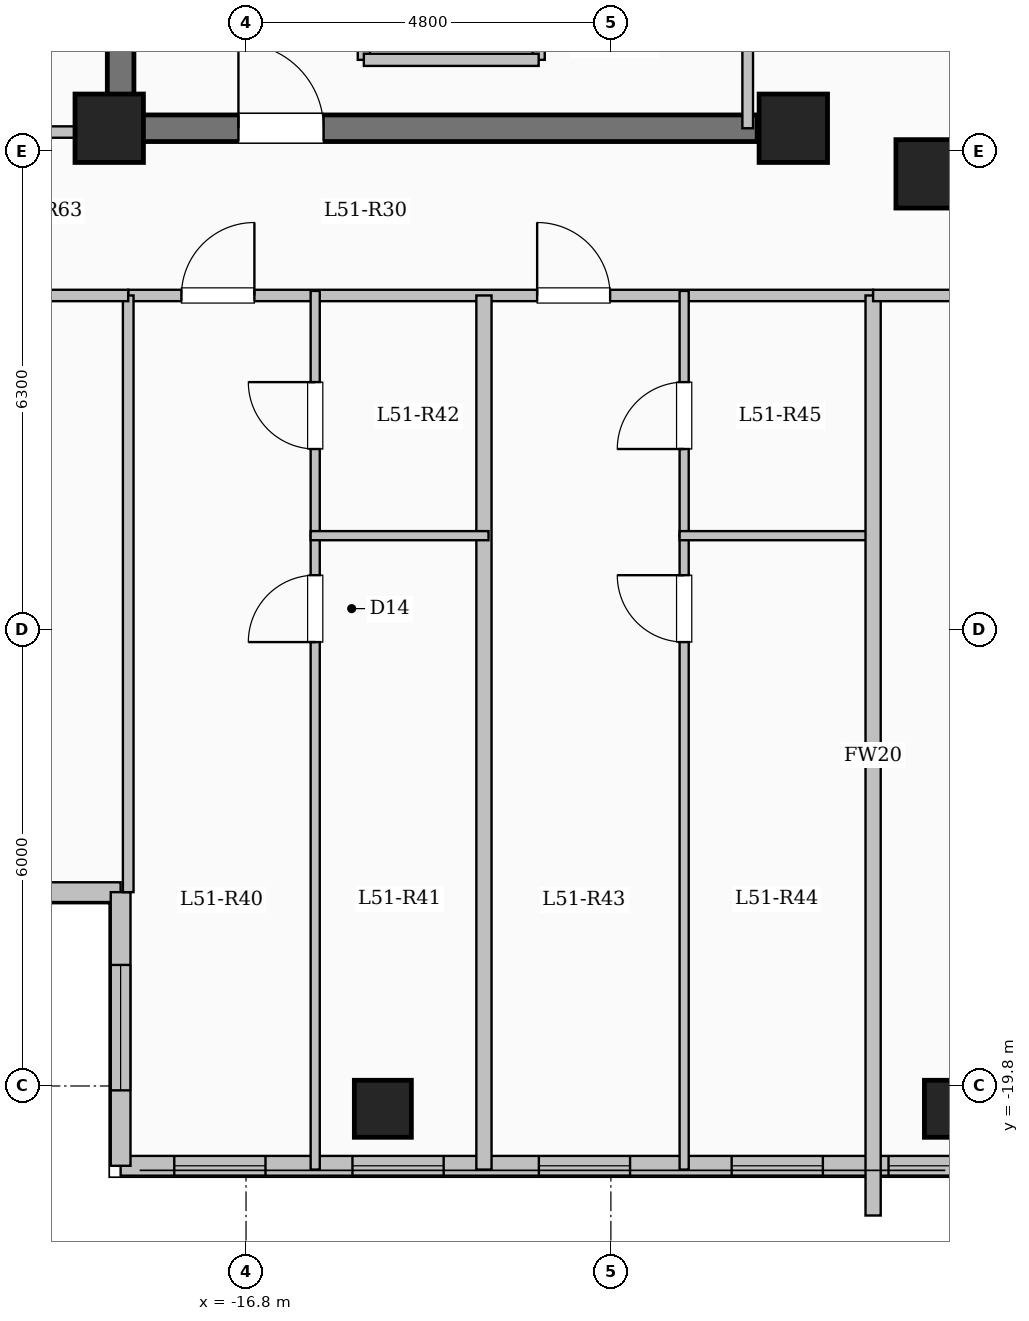
"""IFC4 building model, lengths in metres.
Left out: names, types, materials, properties, quantities, classifications, styles, units other than length and angle.
Written with IfcOpenShell. Run it as: python <this file> out.ifc"""

import sys

from ifc_helpers import new_model, si_unit, direction, frame, frame_2d, origin, origin_2d, place, context, subcontext, project, spatial, rectangle, extrude, element, fill, save


model = new_model("IFC4")
c1 = context("Model", 3, precision=1e-05, world=origin(), true_north=direction((0.0, 1.0)))
c2 = subcontext(c1, "Body", "Model", "MODEL_VIEW")
j1 = project(units=[si_unit("LENGTHUNIT", "METRE"), si_unit("PLANEANGLEUNIT", "RADIAN")], contexts=[c1])
p1 = place(None, origin())
s1 = spatial("IfcSite", under=j1, at=p1, CompositionType="ELEMENT")
p2 = place(p1, origin())
s2 = spatial("IfcBuilding", under=s1, at=p2, CompositionType="ELEMENT")
p3 = place(p2, frame((0.0, 0.0, 190.25)))
s3 = spatial("IfcBuildingStorey", under=s2, at=p3, CompositionType="ELEMENT", Elevation=190.25)
for number, where, z_axis, x_axis in (
    (1, (-7.8, -7.8, 0.0), (0.0, 0.0, 1.0), (1.0, 0.0, 0.0)),
    (2, (-9.6, -7.2, 0.0), (0.0, 0.0, 1.0), (1.0, 0.0, 0.0)),
    (3, (-18.6, -7.2, 0.0), (0.0, 0.0, 1.0), (1.0, 0.0, 0.0)),
):
    element("IfcColumn", number, at=place(p3, frame(where, z_axis=z_axis, x_axis=x_axis)), inside=s3, PredefinedType="COLUMN", context=c2, shape_type="SweptSolid", body=[
        extrude(rectangle(XDim=0.9, YDim=0.9, at=origin_2d()), origin(), (0.0, 0.0, 1.0), 3.35),
    ])
for number, where, z_axis, x_axis in (
    (4, (-15.0, -20.1, 0.0), (0.0, 0.0, 1.0), (1.0, 0.0, 0.0)),
    (5, (-7.5, -20.1, 0.0), (0.0, 0.0, 1.0), (1.0, 0.0, 0.0)),
):
    element("IfcColumn", number, at=place(p3, frame(where, z_axis=z_axis, x_axis=x_axis)), inside=s3, PredefinedType="COLUMN", context=c2, shape_type="SweptSolid", body=[
        extrude(rectangle(XDim=0.75, YDim=0.75, at=origin_2d()), origin(), (0.0, 0.0, 1.0), 3.35),
    ])
p4 = place(p3, frame((-18.45, -17.25, 0.0), z_axis=(0.0, 0.0, 1.0), x_axis=(-1.0, 0.0, 0.0)))
e6 = element("IfcWall", 6, at=p4, inside=s3, PredefinedType="SOLIDWALL", context=c2, shape_type="SweptSolid", body=[
    extrude(rectangle(XDim=5.1, YDim=0.26, at=frame_2d((2.55, 0.0))), origin(), (0.0, 0.0, 1.0), 3.1),
])
p5 = place(p4, frame((1.425, 0.0, 0.9)))
e7 = element("IfcOpeningElement", 7, at=p5, cuts=e6, PredefinedType="OPENING", context=c2, shape_type="SweptSolid", body=[
    extrude(rectangle(XDim=2.2, YDim=1.75, at=frame_2d((1.1, 0.875))), frame((0.0, 0.14, 0.0), z_axis=(0.0, -1.0, 0.0), x_axis=(1.0, 0.0, 0.0)), (0.0, 0.0, 1.0), 0.28),
])
p6 = place(p3, frame((-7.35, -20.85, 0.0), z_axis=(0.0, 0.0, 1.0), x_axis=(-1.0, 0.0, 0.0)))
e8 = element("IfcWall", 8, at=p6, inside=s3, PredefinedType="SOLIDWALL", context=c2, shape_type="SweptSolid", body=[
    extrude(rectangle(XDim=11.1, YDim=0.26, at=frame_2d((5.55, 0.0))), origin(), (0.0, 0.0, 1.0), 3.1),
])
p7 = place(p6, frame((0.147, 0.0, 0.95)))
e9 = element("IfcOpeningElement", 9, at=p7, cuts=e8, PredefinedType="OPENING", context=c2, shape_type="SweptSolid", body=[
    extrude(rectangle(XDim=0.85, YDim=1.5, at=frame_2d((0.425, 0.75))), frame((0.0, 0.14, 0.0), z_axis=(0.0, -1.0, 0.0), x_axis=(1.0, 0.0, 0.0)), (0.0, 0.0, 1.0), 0.28),
])
p8 = place(p6, frame((1.861, 0.0, 0.95)))
e10 = element("IfcOpeningElement", 10, at=p8, cuts=e8, PredefinedType="OPENING", context=c2, shape_type="SweptSolid", body=[
    extrude(rectangle(XDim=1.2, YDim=1.5, at=frame_2d((0.6, 0.75))), frame((0.0, 0.14, 0.0), z_axis=(0.0, -1.0, 0.0), x_axis=(1.0, 0.0, 0.0)), (0.0, 0.0, 1.0), 0.28),
])
p9 = place(p6, frame((4.397, 0.0, 0.95)))
e11 = element("IfcOpeningElement", 11, at=p9, cuts=e8, PredefinedType="OPENING", context=c2, shape_type="SweptSolid", body=[
    extrude(rectangle(XDim=1.2, YDim=1.5, at=frame_2d((0.6, 0.75))), frame((0.0, 0.14, 0.0), z_axis=(0.0, -1.0, 0.0), x_axis=(1.0, 0.0, 0.0)), (0.0, 0.0, 1.0), 0.28),
])
p10 = place(p6, frame((6.85, 0.0, 0.95)))
e12 = element("IfcOpeningElement", 12, at=p10, cuts=e8, PredefinedType="OPENING", context=c2, shape_type="SweptSolid", body=[
    extrude(rectangle(XDim=1.2, YDim=1.5, at=frame_2d((0.6, 0.75))), frame((0.0, 0.14, 0.0), z_axis=(0.0, -1.0, 0.0), x_axis=(1.0, 0.0, 0.0)), (0.0, 0.0, 1.0), 0.28),
])
p11 = place(p6, frame((9.194, 0.0, 0.95)))
e13 = element("IfcOpeningElement", 13, at=p11, cuts=e8, PredefinedType="OPENING", context=c2, shape_type="SweptSolid", body=[
    extrude(rectangle(XDim=1.2, YDim=1.5, at=frame_2d((0.6, 0.75))), frame((0.0, 0.14, 0.0), z_axis=(0.0, -1.0, 0.0), x_axis=(1.0, 0.0, 0.0)), (0.0, 0.0, 1.0), 0.28),
])
p12 = place(p3, frame((-18.45, -20.85, 0.0), z_axis=(0.0, 0.0, 1.0), x_axis=(0.0, 1.0, 0.0)))
e14 = element("IfcWall", 14, at=p12, inside=s3, PredefinedType="SOLIDWALL", context=c2, shape_type="SweptSolid", body=[
    extrude(rectangle(XDim=3.6, YDim=0.26, at=frame_2d((1.8, 0.0))), origin(), (0.0, 0.0, 1.0), 3.1),
])
p13 = place(p12, frame((0.992, 0.0, 0.9)))
e15 = element("IfcOpeningElement", 15, at=p13, cuts=e14, PredefinedType="OPENING", context=c2, shape_type="SweptSolid", body=[
    extrude(rectangle(XDim=1.65, YDim=1.6, at=frame_2d((0.825, 0.8))), frame((0.0, 0.14, 0.0), z_axis=(0.0, -1.0, 0.0), x_axis=(1.0, 0.0, 0.0)), (0.0, 0.0, 1.0), 0.28),
])
p14 = place(p3, frame((-15.25, -6.3, 0.0), z_axis=(0.0, 0.0, 1.0), x_axis=(0.0, 1.0, 0.0)))
e16 = element("IfcWall", 16, at=p14, inside=s3, PredefinedType="SOLIDWALL", context=c2, shape_type="SweptSolid", body=[
    extrude(rectangle(XDim=2.6, YDim=0.16, at=frame_2d((1.3, 0.0))), origin(), (0.0, 0.0, 1.0), 3.1),
])
p15 = place(p14, frame((0.75, 0.0, 0.0)))
e17 = element("IfcOpeningElement", 17, at=p15, cuts=e16, PredefinedType="OPENING", context=c2, shape_type="SweptSolid", body=[
    extrude(rectangle(XDim=1.1, YDim=2.15, at=frame_2d((0.55, 1.075))), frame((0.0, 0.09, 0.0), z_axis=(0.0, -1.0, 0.0), x_axis=(1.0, 0.0, 0.0)), (0.0, 0.0, 1.0), 0.18),
])
p16 = place(p3, frame((-12.95, -6.3, 0.0), z_axis=(0.0, 0.0, 1.0), x_axis=(0.0, 1.0, 0.0)))
e18 = element("IfcWall", 18, at=p16, inside=s3, PredefinedType="SOLIDWALL", context=c2, shape_type="SweptSolid", body=[
    extrude(rectangle(XDim=2.6, YDim=0.16, at=frame_2d((1.3, 0.0))), origin(), (0.0, 0.0, 1.0), 3.1),
])
p17 = place(p3, frame((-15.25, -6.3, 0.0), z_axis=(0.0, 0.0, 1.0), x_axis=(1.0, 0.0, 0.0)))
e19 = element("IfcWall", 19, at=p17, inside=s3, PredefinedType="SOLIDWALL", context=c2, shape_type="SweptSolid", body=[
    extrude(rectangle(XDim=2.3, YDim=0.16, at=frame_2d((1.15, 0.0))), origin(), (0.0, 0.0, 1.0), 3.1),
])
p18 = place(p3, frame((-18.45, -7.375, 0.0), z_axis=(0.0, 0.0, 1.0), x_axis=(0.0, 1.0, 0.0)))
e20 = element("IfcWall", 20, at=p18, inside=s3, PredefinedType="SHEAR", context=c2, shape_type="SweptSolid", body=[
    extrude(rectangle(XDim=14.05, YDim=0.35, at=frame_2d((7.025, 0.0))), origin(), (0.0, 0.0, 1.0), 3.35),
])
p19 = place(p3, frame((-18.625, -7.2, 0.0), z_axis=(0.0, 0.0, 1.0), x_axis=(1.0, 0.0, 0.0)))
e21 = element("IfcWall", 21, at=p19, inside=s3, PredefinedType="SHEAR", context=c2, shape_type="SweptSolid", body=[
    extrude(rectangle(XDim=8.55, YDim=0.35, at=frame_2d((4.275, 0.0))), origin(), (0.0, 0.0, 1.0), 3.35),
])
p20 = place(p19, frame((1.725, 0.0, 0.0)))
e22 = element("IfcOpeningElement", 22, at=p20, cuts=e21, PredefinedType="OPENING", context=c2, shape_type="SweptSolid", body=[
    extrude(rectangle(XDim=1.12, YDim=2.15, at=frame_2d((0.56, 1.075))), frame((0.0, 0.185, 0.0), z_axis=(0.0, -1.0, 0.0), x_axis=(1.0, 0.0, 0.0)), (0.0, 0.0, 1.0), 0.37),
])
p21 = place(p3, frame((-10.2, -7.2, 0.0), z_axis=(0.0, 0.0, 1.0), x_axis=(0.0, 1.0, 0.0)))
e23 = element("IfcWall", 23, at=p21, inside=s3, PredefinedType="PARTITIONING", context=c2, shape_type="SweptSolid", body=[
    extrude(rectangle(XDim=9.12, YDim=0.14, at=frame_2d((4.56, 0.0))), origin(), (0.0, 0.0, 1.0), 3.1),
])
p22 = place(p21, frame((1.75, 0.0, 0.0)))
e24 = element("IfcOpeningElement", 24, at=p22, cuts=e23, PredefinedType="OPENING", context=c2, shape_type="SweptSolid", body=[
    extrude(rectangle(XDim=0.95, YDim=2.12, at=frame_2d((0.475, 1.06))), frame((0.0, 0.08, 0.0), z_axis=(0.0, -1.0, 0.0), x_axis=(1.0, 0.0, 0.0)), (0.0, 0.0, 1.0), 0.16),
])
p23 = place(p21, frame((5.0, 0.0, 0.0)))
e25 = element("IfcOpeningElement", 25, at=p23, cuts=e23, PredefinedType="OPENING", context=c2, shape_type="SweptSolid", body=[
    extrude(rectangle(XDim=0.95, YDim=2.12, at=frame_2d((0.475, 1.06))), frame((0.0, 0.08, 0.0), z_axis=(0.0, -1.0, 0.0), x_axis=(1.0, 0.0, 0.0)), (0.0, 0.0, 1.0), 0.16),
])
p24 = place(p3, frame((-18.35, -9.4, 0.0), z_axis=(0.0, 0.0, 1.0), x_axis=(1.0, 0.0, 0.0)))
e26 = element("IfcWall", 26, at=p24, inside=s3, PredefinedType="PARTITIONING", context=c2, shape_type="SweptSolid", body=[
    extrude(rectangle(XDim=9.8, YDim=0.15, at=frame_2d((4.9, 0.0))), origin(), (0.0, 0.0, 1.0), 3.1),
])
p25 = place(p24, frame((0.7, 0.0, 0.0)))
e27 = element("IfcOpeningElement", 27, at=p25, cuts=e26, PredefinedType="OPENING", context=c2, shape_type="SweptSolid", body=[
    extrude(rectangle(XDim=0.96, YDim=2.15, at=frame_2d((0.48, 1.075))), frame((0.0, 0.085, 0.0), z_axis=(0.0, -1.0, 0.0), x_axis=(1.0, 0.0, 0.0)), (0.0, 0.0, 1.0), 0.17),
])
p26 = place(p24, frame((5.38, 0.0, 0.0)))
e28 = element("IfcOpeningElement", 28, at=p26, cuts=e26, PredefinedType="OPENING", context=c2, shape_type="SweptSolid", body=[
    extrude(rectangle(XDim=0.96, YDim=2.15, at=frame_2d((0.48, 1.075))), frame((0.0, 0.085, 0.0), z_axis=(0.0, -1.0, 0.0), x_axis=(1.0, 0.0, 0.0)), (0.0, 0.0, 1.0), 0.17),
])
p27 = place(p3, frame((-13.67, -20.9, 0.0), z_axis=(0.0, 0.0, 1.0), x_axis=(0.0, 1.0, 0.0)))
e29 = element("IfcWall", 29, at=p27, inside=s3, PredefinedType="SOLIDWALL", context=c2, shape_type="SweptSolid", body=[
    extrude(rectangle(XDim=11.5, YDim=0.2, at=frame_2d((5.75, 0.0))), origin(), (0.0, 0.0, 1.0), 3.1),
])
p28 = place(p3, frame((-15.89, -20.9, 0.0), z_axis=(0.0, 0.0, 1.0), x_axis=(0.0, 1.0, 0.0)))
e30 = element("IfcWall", 30, at=p28, inside=s3, PredefinedType="PARTITIONING", context=c2, shape_type="SweptSolid", body=[
    extrude(rectangle(XDim=8.34, YDim=0.12, at=frame_2d((4.17, 0.0))), origin(), (0.0, 0.0, 1.0), 3.1),
])
p29 = place(p28, frame((6.94, 0.0, 0.0)))
e31 = element("IfcOpeningElement", 31, at=p29, cuts=e30, PredefinedType="OPENING", context=c2, shape_type="SweptSolid", body=[
    extrude(rectangle(XDim=0.88, YDim=2.1, at=frame_2d((0.44, 1.05))), frame((0.0, 0.07, 0.0), z_axis=(0.0, -1.0, 0.0), x_axis=(1.0, 0.0, 0.0)), (0.0, 0.0, 1.0), 0.14),
])
p30 = place(p3, frame((-15.89, -12.56, 0.0), z_axis=(0.0, 0.0, 1.0), x_axis=(0.0, 1.0, 0.0)))
e32 = element("IfcWall", 32, at=p30, inside=s3, PredefinedType="PARTITIONING", context=c2, shape_type="SweptSolid", body=[
    extrude(rectangle(XDim=3.22, YDim=0.12, at=frame_2d((1.61, 0.0))), origin(), (0.0, 0.0, 1.0), 3.1),
])
p31 = place(p30, frame((1.14, 0.0, 0.0)))
e33 = element("IfcOpeningElement", 33, at=p31, cuts=e32, PredefinedType="OPENING", context=c2, shape_type="SweptSolid", body=[
    extrude(rectangle(XDim=0.88, YDim=2.1, at=frame_2d((0.44, 1.05))), frame((0.0, 0.07, 0.0), z_axis=(0.0, -1.0, 0.0), x_axis=(1.0, 0.0, 0.0)), (0.0, 0.0, 1.0), 0.14),
])
p32 = place(p3, frame((-15.95, -12.56, 0.0), z_axis=(0.0, 0.0, 1.0), x_axis=(1.0, 0.0, 0.0)))
e34 = element("IfcWall", 34, at=p32, inside=s3, PredefinedType="PARTITIONING", context=c2, shape_type="SweptSolid", body=[
    extrude(rectangle(XDim=2.34, YDim=0.12, at=frame_2d((1.17, 0.0))), origin(), (0.0, 0.0, 1.0), 2.725),
])
p33 = place(p3, frame((-11.036, -20.9, 0.0), z_axis=(0.0, 0.0, 1.0), x_axis=(0.0, 1.0, 0.0)))
e35 = element("IfcWall", 35, at=p33, inside=s3, PredefinedType="PARTITIONING", context=c2, shape_type="SweptSolid", body=[
    extrude(rectangle(XDim=8.34, YDim=0.12, at=frame_2d((4.17, 0.0))), origin(), (0.0, 0.0, 1.0), 3.1),
])
p34 = place(p33, frame((6.94, 0.0, 0.0)))
e36 = element("IfcOpeningElement", 36, at=p34, cuts=e35, PredefinedType="OPENING", context=c2, shape_type="SweptSolid", body=[
    extrude(rectangle(XDim=0.88, YDim=2.1, at=frame_2d((0.44, 1.05))), frame((0.0, 0.07, 0.0), z_axis=(0.0, -1.0, 0.0), x_axis=(1.0, 0.0, 0.0)), (0.0, 0.0, 1.0), 0.14),
])
p35 = place(p3, frame((-11.036, -12.56, 0.0), z_axis=(0.0, 0.0, 1.0), x_axis=(0.0, 1.0, 0.0)))
e37 = element("IfcWall", 37, at=p35, inside=s3, PredefinedType="PARTITIONING", context=c2, shape_type="SweptSolid", body=[
    extrude(rectangle(XDim=3.22, YDim=0.12, at=frame_2d((1.61, 0.0))), origin(), (0.0, 0.0, 1.0), 3.1),
])
p36 = place(p35, frame((1.14, 0.0, 0.0)))
e38 = element("IfcOpeningElement", 38, at=p36, cuts=e37, PredefinedType="OPENING", context=c2, shape_type="SweptSolid", body=[
    extrude(rectangle(XDim=0.88, YDim=2.1, at=frame_2d((0.44, 1.05))), frame((0.0, 0.07, 0.0), z_axis=(0.0, -1.0, 0.0), x_axis=(1.0, 0.0, 0.0)), (0.0, 0.0, 1.0), 0.14),
])
p37 = place(p3, frame((-11.096, -12.56, 0.0), z_axis=(0.0, 0.0, 1.0), x_axis=(1.0, 0.0, 0.0)))
e39 = element("IfcWall", 39, at=p37, inside=s3, PredefinedType="PARTITIONING", context=c2, shape_type="SweptSolid", body=[
    extrude(rectangle(XDim=2.556, YDim=0.12, at=frame_2d((1.278, 0.0))), origin(), (0.0, 0.0, 1.0), 2.725),
])
p38 = place(p3, frame((-8.55, -21.504, 0.0), z_axis=(0.0, 0.0, 1.0), x_axis=(0.0, 1.0, 0.0)))
e40 = element("IfcWall", 40, at=p38, inside=s3, PredefinedType="SOLIDWALL", context=c2, shape_type="SweptSolid", body=[
    extrude(rectangle(XDim=12.104, YDim=0.2, at=frame_2d((6.052, 0.0))), origin(), (0.0, 0.0, 1.0), 3.1),
])
p39 = place(p3, frame((-8.55, -9.4, 0.0), z_axis=(0.0, 0.0, 1.0), x_axis=(1.0, 0.0, 0.0)))
e41 = element("IfcWall", 41, at=p39, inside=s3, PredefinedType="PARTITIONING", context=c2, shape_type="SweptSolid", body=[
    extrude(rectangle(XDim=17.1, YDim=0.15, at=frame_2d((8.55, 0.0))), origin(), (0.0, 0.0, 1.0), 3.1),
])
p40 = place(p39, frame((1.9, 0.0, 0.0)))
e42 = element("IfcOpeningElement", 42, at=p40, cuts=e41, PredefinedType="OPENING", context=c2, shape_type="SweptSolid", body=[
    extrude(rectangle(XDim=0.96, YDim=2.15, at=frame_2d((0.48, 1.075))), frame((0.0, 0.085, 0.0), z_axis=(0.0, -1.0, 0.0), x_axis=(1.0, 0.0, 0.0)), (0.0, 0.0, 1.0), 0.17),
])
p41 = place(p3, frame((-23.58, -7.25, 0.0), z_axis=(0.0, 0.0, 1.0), x_axis=(1.0, 0.0, 0.0)))
e43 = element("IfcWall", 43, at=p41, inside=s3, PredefinedType="PARTITIONING", context=c2, shape_type="SweptSolid", body=[
    extrude(rectangle(XDim=5.13, YDim=0.15, at=frame_2d((2.565, 0.0))), origin(), (0.0, 0.0, 1.0), 3.1),
])
p42 = place(p41, frame((2.08, 0.0, 0.0)))
e44 = element("IfcOpeningElement", 44, at=p42, cuts=e43, PredefinedType="OPENING", context=c2, shape_type="SweptSolid", body=[
    extrude(rectangle(XDim=1.08, YDim=2.15, at=frame_2d((0.54, 1.075))), frame((0.0, 0.085, 0.0), z_axis=(0.0, -1.0, 0.0), x_axis=(1.0, 0.0, 0.0)), (0.0, 0.0, 1.0), 0.17),
])
p43 = place(p3, frame((-18.35, -17.25, 0.0), z_axis=(0.0, 0.0, 1.0), x_axis=(0.0, 1.0, 0.0)))
e45 = element("IfcWall", 45, at=p43, inside=s3, PredefinedType="PARTITIONING", context=c2, shape_type="SweptSolid", body=[
    extrude(rectangle(XDim=7.85, YDim=0.14, at=frame_2d((3.925, 0.0))), origin(), (0.0, 0.0, 1.0), 3.1),
])
p44 = place(p3, frame((-23.58, -9.4, 0.0), z_axis=(0.0, 0.0, 1.0), x_axis=(1.0, 0.0, 0.0)))
e46 = element("IfcWall", 46, at=p44, inside=s3, PredefinedType="PARTITIONING", context=c2, shape_type="SweptSolid", body=[
    extrude(rectangle(XDim=5.23, YDim=0.15, at=frame_2d((2.615, 0.0))), origin(), (0.0, 0.0, 1.0), 3.1),
])
p45 = place(p44, frame((2.14, 0.0, 0.0)))
e47 = element("IfcOpeningElement", 47, at=p45, cuts=e46, PredefinedType="OPENING", context=c2, shape_type="SweptSolid", body=[
    extrude(rectangle(XDim=0.95, YDim=2.15, at=frame_2d((0.475, 1.075))), frame((0.0, 0.085, 0.0), z_axis=(0.0, -1.0, 0.0), x_axis=(1.0, 0.0, 0.0)), (0.0, 0.0, 1.0), 0.17),
])
p46 = place(p7, origin())
e48 = element("IfcWindow", 48, at=p46, inside=s3, PartitioningType="SINGLE_PANEL", PredefinedType="WINDOW", context=c2, shape_type="SweptSolid", body=[
    extrude(rectangle(XDim=0.85, YDim=1.5, at=frame_2d((0.425, 0.75))), frame((0.0, 0.03, 0.0), z_axis=(0.0, -1.0, 0.0), x_axis=(1.0, 0.0, 0.0)), (0.0, 0.0, 1.0), 0.06),
])
fill(e9, e48)
p47 = place(p8, origin())
e49 = element("IfcWindow", 49, at=p47, inside=s3, PartitioningType="SINGLE_PANEL", PredefinedType="WINDOW", context=c2, shape_type="SweptSolid", body=[
    extrude(rectangle(XDim=1.2, YDim=1.5, at=frame_2d((0.6, 0.75))), frame((0.0, 0.03, 0.0), z_axis=(0.0, -1.0, 0.0), x_axis=(1.0, 0.0, 0.0)), (0.0, 0.0, 1.0), 0.06),
])
fill(e10, e49)
p48 = place(p9, origin())
e50 = element("IfcWindow", 50, at=p48, inside=s3, PartitioningType="SINGLE_PANEL", PredefinedType="WINDOW", context=c2, shape_type="SweptSolid", body=[
    extrude(rectangle(XDim=1.2, YDim=1.5, at=frame_2d((0.6, 0.75))), frame((0.0, 0.03, 0.0), z_axis=(0.0, -1.0, 0.0), x_axis=(1.0, 0.0, 0.0)), (0.0, 0.0, 1.0), 0.06),
])
fill(e11, e50)
p49 = place(p10, origin())
e51 = element("IfcWindow", 51, at=p49, inside=s3, PartitioningType="SINGLE_PANEL", PredefinedType="WINDOW", context=c2, shape_type="SweptSolid", body=[
    extrude(rectangle(XDim=1.2, YDim=1.5, at=frame_2d((0.6, 0.75))), frame((0.0, 0.03, 0.0), z_axis=(0.0, -1.0, 0.0), x_axis=(1.0, 0.0, 0.0)), (0.0, 0.0, 1.0), 0.06),
])
fill(e12, e51)
p50 = place(p11, origin())
e52 = element("IfcWindow", 52, at=p50, inside=s3, PartitioningType="SINGLE_PANEL", PredefinedType="WINDOW", context=c2, shape_type="SweptSolid", body=[
    extrude(rectangle(XDim=1.2, YDim=1.5, at=frame_2d((0.6, 0.75))), frame((0.0, 0.03, 0.0), z_axis=(0.0, -1.0, 0.0), x_axis=(1.0, 0.0, 0.0)), (0.0, 0.0, 1.0), 0.06),
])
fill(e13, e52)
p51 = place(p13, origin())
e53 = element("IfcWindow", 53, at=p51, inside=s3, PartitioningType="SINGLE_PANEL", PredefinedType="WINDOW", context=c2, shape_type="SweptSolid", body=[
    extrude(rectangle(XDim=1.65, YDim=1.6, at=frame_2d((0.825, 0.8))), frame((0.0, 0.03, 0.0), z_axis=(0.0, -1.0, 0.0), x_axis=(1.0, 0.0, 0.0)), (0.0, 0.0, 1.0), 0.06),
])
fill(e15, e53)
p52 = place(p20, origin())
e54 = element("IfcDoor", 54, at=p52, inside=s3, OperationType="SINGLE_SWING_LEFT", PredefinedType="DOOR", context=c2, shape_type="SweptSolid", body=[
    extrude(rectangle(XDim=1.12, YDim=2.15, at=frame_2d((0.56, 1.075))), frame((0.0, 0.025, 0.0), z_axis=(0.0, -1.0, 0.0), x_axis=(1.0, 0.0, 0.0)), (0.0, 0.0, 1.0), 0.05),
])
fill(e22, e54)
p53 = place(p25, origin())
e55 = element("IfcDoor", 55, at=p53, inside=s3, OperationType="SINGLE_SWING_RIGHT", PredefinedType="DOOR", context=c2, shape_type="SweptSolid", body=[
    extrude(rectangle(XDim=0.96, YDim=2.15, at=frame_2d((0.48, 1.075))), frame((0.0, 0.025, 0.0), z_axis=(0.0, -1.0, 0.0), x_axis=(1.0, 0.0, 0.0)), (0.0, 0.0, 1.0), 0.05),
])
fill(e27, e55)
p54 = place(p29, origin())
e56 = element("IfcDoor", 56, at=p54, inside=s3, OperationType="SINGLE_SWING_LEFT", PredefinedType="DOOR", context=c2, shape_type="SweptSolid", body=[
    extrude(rectangle(XDim=0.88, YDim=2.1, at=frame_2d((0.44, 1.05))), frame((0.0, 0.025, 0.0), z_axis=(0.0, -1.0, 0.0), x_axis=(1.0, 0.0, 0.0)), (0.0, 0.0, 1.0), 0.05),
])
fill(e31, e56)
p55 = place(p31, origin())
e57 = element("IfcDoor", 57, at=p55, inside=s3, OperationType="SINGLE_SWING_RIGHT", PredefinedType="DOOR", context=c2, shape_type="SweptSolid", body=[
    extrude(rectangle(XDim=0.88, YDim=2.1, at=frame_2d((0.44, 1.05))), frame((0.0, 0.025, 0.0), z_axis=(0.0, -1.0, 0.0), x_axis=(1.0, 0.0, 0.0)), (0.0, 0.0, 1.0), 0.05),
])
fill(e33, e57)
p56 = place(p26, origin())
e58 = element("IfcDoor", 58, at=p56, inside=s3, OperationType="SINGLE_SWING_LEFT", PredefinedType="DOOR", context=c2, shape_type="SweptSolid", body=[
    extrude(rectangle(XDim=0.96, YDim=2.15, at=frame_2d((0.48, 1.075))), frame((0.0, 0.025, 0.0), z_axis=(0.0, -1.0, 0.0), x_axis=(1.0, 0.0, 0.0)), (0.0, 0.0, 1.0), 0.05),
])
fill(e28, e58)
p57 = place(p34, origin())
e59 = element("IfcDoor", 59, at=p57, inside=s3, OperationType="SINGLE_SWING_RIGHT", PredefinedType="DOOR", context=c2, shape_type="SweptSolid", body=[
    extrude(rectangle(XDim=0.88, YDim=2.1, at=frame_2d((0.44, 1.05))), frame((0.0, 0.025, 0.0), z_axis=(0.0, -1.0, 0.0), x_axis=(1.0, 0.0, 0.0)), (0.0, 0.0, 1.0), 0.05),
])
fill(e36, e59)
p58 = place(p36, origin())
e60 = element("IfcDoor", 60, at=p58, inside=s3, OperationType="SINGLE_SWING_LEFT", PredefinedType="DOOR", context=c2, shape_type="SweptSolid", body=[
    extrude(rectangle(XDim=0.88, YDim=2.1, at=frame_2d((0.44, 1.05))), frame((0.0, 0.025, 0.0), z_axis=(0.0, -1.0, 0.0), x_axis=(1.0, 0.0, 0.0)), (0.0, 0.0, 1.0), 0.05),
])
fill(e38, e60)
save(model, sys.argv[1])
